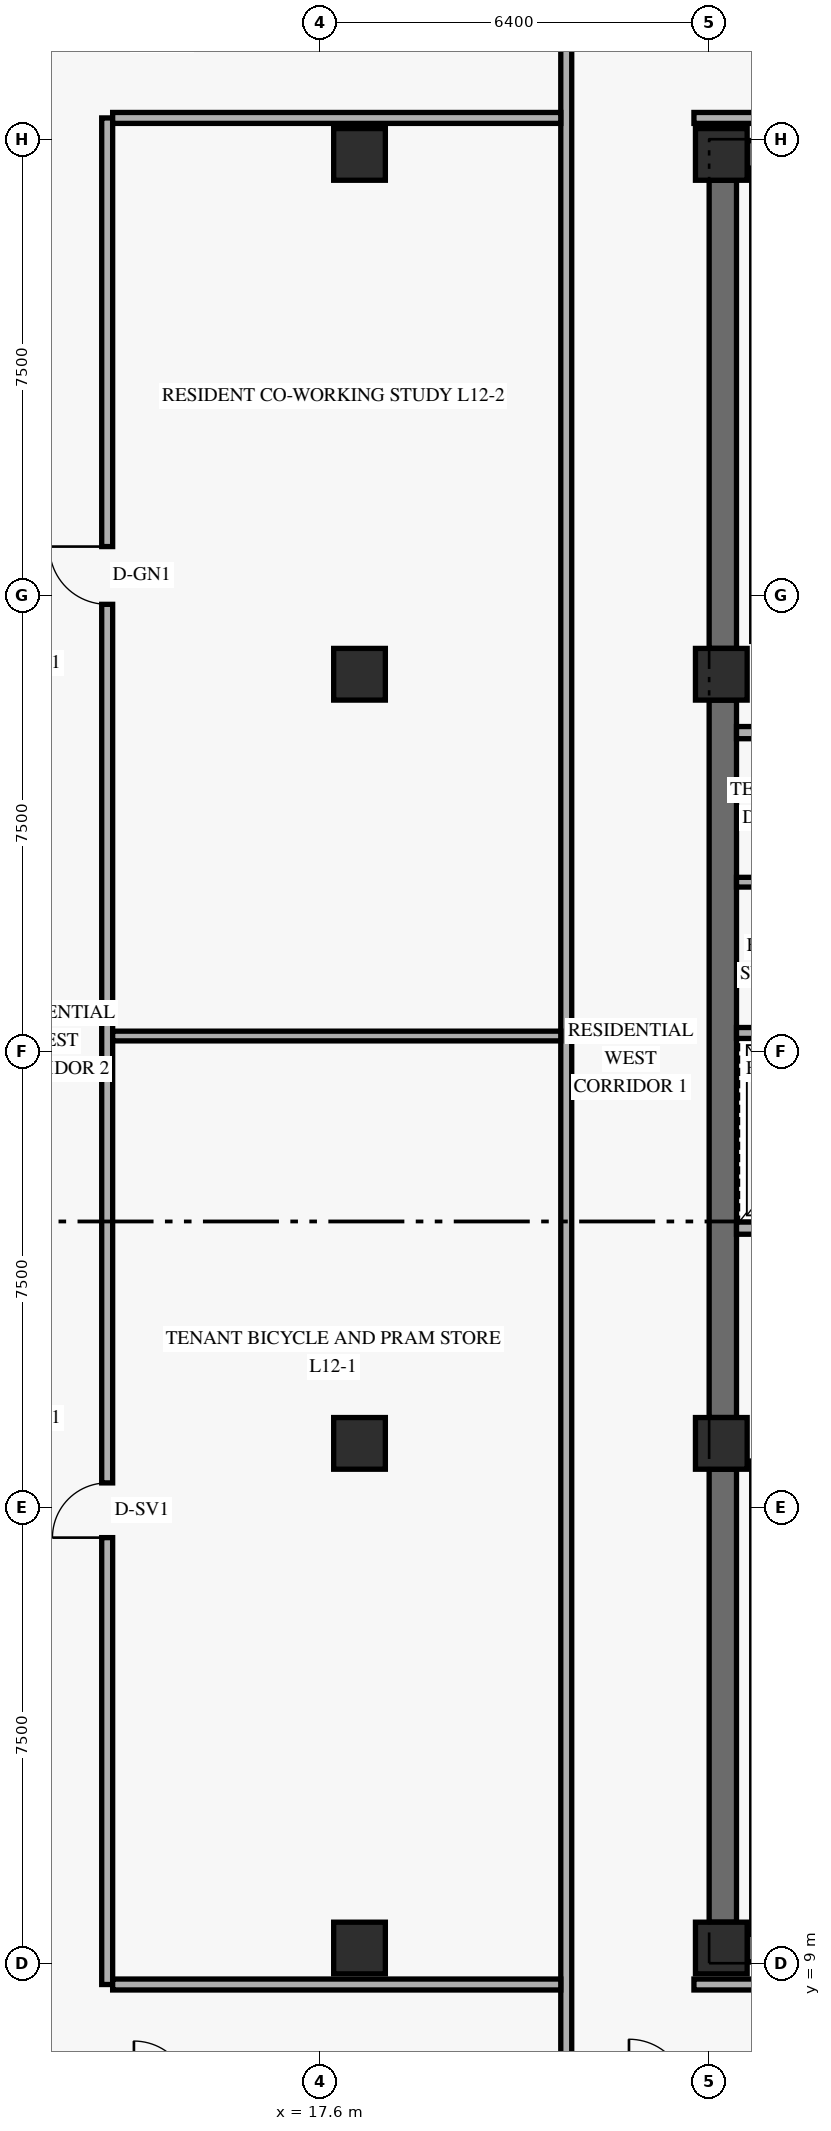
"""IFC4 building model, lengths in metres.
Left out: names, types, materials, properties, quantities, classifications, styles, units other than length and angle.
Written with IfcOpenShell. Run it as: python <this file> out.ifc"""

import sys

from ifc_helpers import new_model, si_unit, direction, frame, frame_2d, origin, origin_2d, place, context, subcontext, project, spatial, rectangle, extrude, element, fill, save


model = new_model("IFC4")
c1 = context("Model", 3, precision=1e-05, world=origin(), true_north=direction((0.0, 1.0)))
c2 = subcontext(c1, "Body", "Model", "MODEL_VIEW")
j1 = project(units=[si_unit("LENGTHUNIT", "METRE"), si_unit("PLANEANGLEUNIT", "RADIAN")], contexts=[c1])
p1 = place(None, origin())
s1 = spatial("IfcSite", under=j1, at=p1, CompositionType="ELEMENT")
p2 = place(p1, origin())
s2 = spatial("IfcBuilding", under=s1, at=p2, CompositionType="ELEMENT")
p3 = place(p2, frame((0.0, 0.0, 49.2)))
s3 = spatial("IfcBuildingStorey", under=s2, at=p3, CompositionType="ELEMENT", Elevation=49.2)
p4 = place(p3, frame((24.225, 9.675, 0.0), z_axis=(0.0, 0.0, 1.0), x_axis=(0.0, 1.0, 0.0)))
e1 = element("IfcWall", 1, at=p4, inside=s3, PredefinedType="SHEAR", context=c2, shape_type="SweptSolid", body=[
    extrude(rectangle(XDim=7.45, YDim=0.45, at=frame_2d((3.725, 0.0))), origin(), (0.0, 0.0, 1.0), 2.667),
])
p5 = place(p3, frame((24.225, 17.975, 0.0), z_axis=(0.0, 0.0, 1.0), x_axis=(0.0, 1.0, 0.0)))
e2 = element("IfcWall", 2, at=p5, inside=s3, PredefinedType="SHEAR", context=c2, shape_type="SweptSolid", body=[
    extrude(rectangle(XDim=11.8, YDim=0.45, at=frame_2d((5.9, 0.0))), origin(), (0.0, 0.0, 1.0), 2.667),
])
p6 = place(p3, frame((24.225, 30.625, 0.0), z_axis=(0.0, 0.0, 1.0), x_axis=(0.0, 1.0, 0.0)))
e3 = element("IfcWall", 3, at=p6, inside=s3, PredefinedType="SHEAR", context=c2, shape_type="SweptSolid", body=[
    extrude(rectangle(XDim=7.7, YDim=0.45, at=frame_2d((3.85, 0.0))), origin(), (0.0, 0.0, 1.0), 2.667),
])
for number, where, z_axis, x_axis in (
    (4, (24.625, 9.25, 0.0), (0.0, 0.0, 1.0), (1.0, 0.0, 0.0)),
    (5, (24.625, 38.75, 0.0), (0.0, 0.0, 1.0), (1.0, 0.0, 0.0)),
):
    element("IfcWall", number, at=place(p3, frame(where, z_axis=z_axis, x_axis=x_axis)), inside=s3, PredefinedType="SHEAR", context=c2, shape_type="SweptSolid", body=[
        extrude(rectangle(XDim=10.15, YDim=0.45, at=frame_2d((5.075, 0.0))), origin(), (0.0, 0.0, 1.0), 3.36),
    ])
for number, where, z_axis, x_axis in (
    (6, (18.25, 9.25, 0.0), (0.0, 0.0, 1.0), (1.0, 0.0, 0.0)),
    (7, (18.25, 17.55, 0.0), (0.0, 0.0, 1.0), (1.0, 0.0, 0.0)),
    (8, (18.25, 30.2, 0.0), (0.0, 0.0, 1.0), (1.0, 0.0, 0.0)),
    (9, (18.25, 38.75, 0.0), (0.0, 0.0, 1.0), (1.0, 0.0, 0.0)),
    (10, (24.2, 9.25, 0.0), (0.0, 0.0, 1.0), (1.0, 0.0, 0.0)),
    (11, (24.2, 17.55, 0.0), (0.0, 0.0, 1.0), (1.0, 0.0, 0.0)),
    (12, (24.2, 30.2, 0.0), (0.0, 0.0, 1.0), (1.0, 0.0, 0.0)),
    (13, (24.2, 38.75, 0.0), (0.0, 0.0, 1.0), (1.0, 0.0, 0.0)),
):
    element("IfcColumn", number, at=place(p3, frame(where, z_axis=z_axis, x_axis=x_axis)), inside=s3, PredefinedType="COLUMN", context=c2, shape_type="SweptSolid", body=[
        extrude(rectangle(XDim=0.85, YDim=0.85, at=origin_2d()), origin(), (0.0, 0.0, 1.0), 3.6),
    ])
p7 = place(p3, frame((24.45, 21.09, 0.0), z_axis=(0.0, 0.0, 1.0), x_axis=(1.0, 0.0, 0.0)))
e14 = element("IfcWall", 14, at=p7, inside=s3, PredefinedType="STANDARD", context=c2, shape_type="SweptSolid", body=[
    extrude(rectangle(XDim=6.83, YDim=0.2, at=frame_2d((3.415, 0.0))), origin(), (0.0, 0.0, 1.0), 3.36),
])
p8 = place(p7, frame((0.72, 0.0, 0.0)))
e15 = element("IfcOpeningElement", 15, at=p8, cuts=e14, PredefinedType="OPENING", context=c2, shape_type="SweptSolid", body=[
    extrude(rectangle(XDim=1.1, YDim=2.2, at=frame_2d((0.55, 1.1))), frame((0.0, 0.11, 0.0), z_axis=(0.0, -1.0, 0.0), x_axis=(1.0, 0.0, 0.0)), (0.0, 0.0, 1.0), 0.22),
])
p9 = place(p7, frame((3.32, 0.0, 0.0)))
e16 = element("IfcOpeningElement", 16, at=p9, cuts=e14, PredefinedType="OPENING", context=c2, shape_type="SweptSolid", body=[
    extrude(rectangle(XDim=1.1, YDim=2.2, at=frame_2d((0.55, 1.1))), frame((0.0, 0.11, 0.0), z_axis=(0.0, -1.0, 0.0), x_axis=(1.0, 0.0, 0.0)), (0.0, 0.0, 1.0), 0.22),
])
p10 = place(p3, frame((24.45, 24.3, 0.0), z_axis=(0.0, 0.0, 1.0), x_axis=(1.0, 0.0, 0.0)))
e17 = element("IfcWall", 17, at=p10, inside=s3, PredefinedType="STANDARD", context=c2, shape_type="SweptSolid", body=[
    extrude(rectangle(XDim=6.83, YDim=0.18, at=frame_2d((3.415, 0.0))), origin(), (0.0, 0.0, 1.0), 3.36),
])
p11 = place(p3, frame((24.45, 29.24, 0.0), z_axis=(0.0, 0.0, 1.0), x_axis=(1.0, 0.0, 0.0)))
e18 = element("IfcWall", 18, at=p11, inside=s3, PredefinedType="STANDARD", context=c2, shape_type="SweptSolid", body=[
    extrude(rectangle(XDim=3.65, YDim=0.2, at=frame_2d((1.825, 0.0))), origin(), (0.0, 0.0, 1.0), 3.36),
])
p12 = place(p3, frame((24.45, 26.78, 0.0), z_axis=(0.0, 0.0, 1.0), x_axis=(1.0, 0.0, 0.0)))
e19 = element("IfcWall", 19, at=p12, inside=s3, PredefinedType="PARTITIONING", context=c2, shape_type="SweptSolid", body=[
    extrude(rectangle(XDim=3.55, YDim=0.16, at=frame_2d((1.775, 0.0))), origin(), (0.0, 0.0, 1.0), 3.36),
])
p13 = place(p3, frame((21.65, 6.8, 0.0), z_axis=(0.0, 0.0, 1.0), x_axis=(0.0, 1.0, 0.0)))
e20 = element("IfcWall", 20, at=p13, inside=s3, PredefinedType="STANDARD", context=c2, shape_type="SweptSolid", body=[
    extrude(rectangle(XDim=34.4, YDim=0.18, at=frame_2d((17.2, 0.0))), origin(), (0.0, 0.0, 1.0), 2.649),
])
for number, where, z_axis, x_axis in (
    (21, (23.75, 8.65, 0.0), (0.0, 0.0, 1.0), (1.0, 0.0, 0.0)),
    (22, (23.75, 39.35, 0.0), (0.0, 0.0, 1.0), (1.0, 0.0, 0.0)),
):
    element("IfcWall", number, at=place(p3, frame(where, z_axis=z_axis, x_axis=x_axis)), inside=s3, PredefinedType="STANDARD", context=c2, shape_type="SweptSolid", body=[
        extrude(rectangle(XDim=11.67, YDim=0.18, at=frame_2d((5.835, 0.0))), origin(), (0.0, 0.0, 1.0), 2.649),
    ])
p14 = place(p3, frame((14.1, 8.65, 0.0), z_axis=(0.0, 0.0, 1.0), x_axis=(0.0, 1.0, 0.0)))
e23 = element("IfcWall", 23, at=p14, inside=s3, PredefinedType="STANDARD", context=c2, shape_type="SweptSolid", body=[
    extrude(rectangle(XDim=30.7, YDim=0.18, at=frame_2d((15.35, 0.0))), origin(), (0.0, 0.0, 1.0), 2.649),
])
p15 = place(p14, frame((7.35, 0.0, 0.0)))
e24 = element("IfcOpeningElement", 24, at=p15, cuts=e23, PredefinedType="OPENING", context=c2, shape_type="SweptSolid", body=[
    extrude(rectangle(XDim=0.9, YDim=2.1, at=frame_2d((0.45, 1.05))), frame((0.0, 0.1, 0.0), z_axis=(0.0, -1.0, 0.0), x_axis=(1.0, 0.0, 0.0)), (0.0, 0.0, 1.0), 0.2),
])
p16 = place(p14, frame((22.7, 0.0, 0.0)))
e25 = element("IfcOpeningElement", 25, at=p16, cuts=e23, PredefinedType="OPENING", context=c2, shape_type="SweptSolid", body=[
    extrude(rectangle(XDim=0.95, YDim=2.15, at=frame_2d((0.475, 1.075))), frame((0.0, 0.1, 0.0), z_axis=(0.0, -1.0, 0.0), x_axis=(1.0, 0.0, 0.0)), (0.0, 0.0, 1.0), 0.2),
])
for number, where, z_axis, x_axis in (
    (26, (14.19, 8.65, 0.0), (0.0, 0.0, 1.0), (1.0, 0.0, 0.0)),
    (27, (14.19, 39.35, 0.0), (0.0, 0.0, 1.0), (1.0, 0.0, 0.0)),
):
    element("IfcWall", number, at=place(p3, frame(where, z_axis=z_axis, x_axis=x_axis)), inside=s3, PredefinedType="STANDARD", context=c2, shape_type="SweptSolid", body=[
        extrude(rectangle(XDim=7.37, YDim=0.18, at=frame_2d((3.685, 0.0))), origin(), (0.0, 0.0, 1.0), 2.649),
    ])
p17 = place(p3, frame((14.19, 24.25, 0.0), z_axis=(0.0, 0.0, 1.0), x_axis=(1.0, 0.0, 0.0)))
e28 = element("IfcWall", 28, at=p17, inside=s3, PredefinedType="PARTITIONING", context=c2, shape_type="SweptSolid", body=[
    extrude(rectangle(XDim=7.37, YDim=0.16, at=frame_2d((3.685, 0.0))), origin(), (0.0, 0.0, 1.0), 2.649),
])
p18 = place(p15, origin())
e29 = element("IfcDoor", 29, at=p18, inside=s3, OperationType="SINGLE_SWING_LEFT", PredefinedType="DOOR", context=c2, shape_type="SweptSolid", body=[
    extrude(rectangle(XDim=0.9, YDim=2.1, at=frame_2d((0.45, 1.05))), frame((0.0, 0.025, 0.0), z_axis=(0.0, -1.0, 0.0), x_axis=(1.0, 0.0, 0.0)), (0.0, 0.0, 1.0), 0.05),
])
fill(e24, e29)
p19 = place(p16, origin())
e30 = element("IfcDoor", 30, at=p19, inside=s3, OperationType="SINGLE_SWING_RIGHT", PredefinedType="DOOR", context=c2, shape_type="SweptSolid", body=[
    extrude(rectangle(XDim=0.95, YDim=2.15, at=frame_2d((0.475, 1.075))), frame((0.0, 0.025, 0.0), z_axis=(0.0, -1.0, 0.0), x_axis=(1.0, 0.0, 0.0)), (0.0, 0.0, 1.0), 0.05),
])
fill(e25, e30)
save(model, sys.argv[1])
